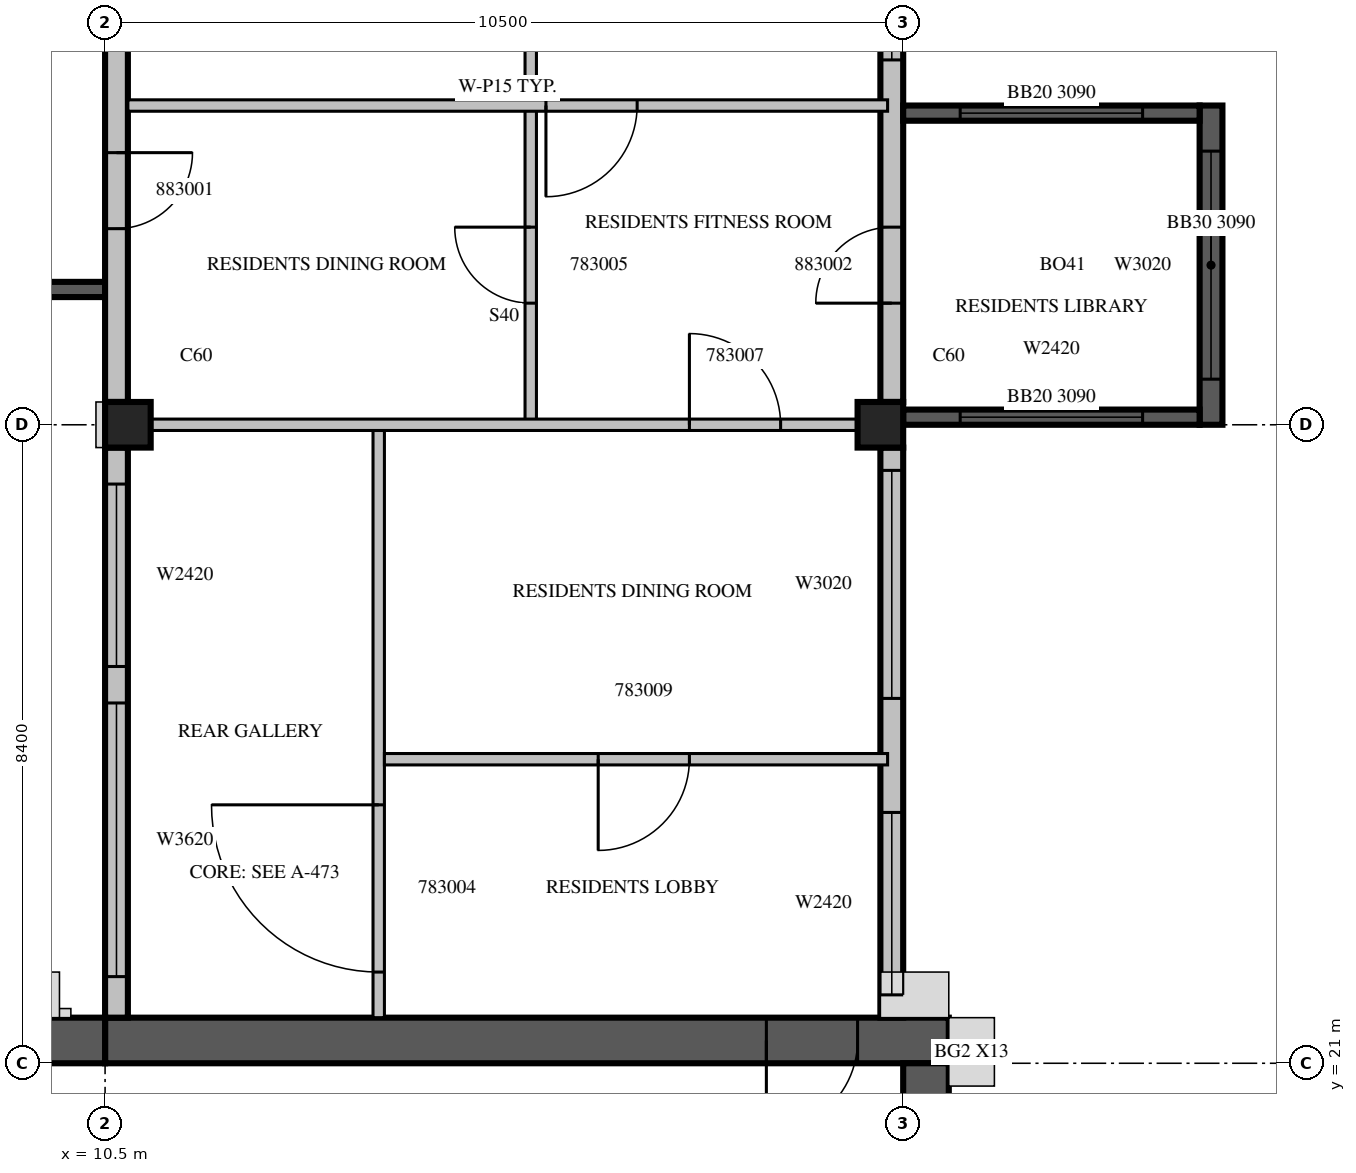
"""IFC4 building model, lengths in metres.
Left out: names, types, materials, properties, quantities, classifications, styles, units other than length and angle.
Written with IfcOpenShell. Run it as: python <this file> out.ifc"""

import sys

from ifc_helpers import new_model, si_unit, direction, frame, frame_2d, origin, origin_2d, place, context, subcontext, project, spatial, rectangle, extrude, source, transform, mapped, element, fill, save


model = new_model("IFC4")
c1 = context("Model", 3, precision=1e-05, world=origin(), true_north=direction((0.0, 1.0)))
c2 = subcontext(c1, "Body", "Model", "MODEL_VIEW")
j1 = project(units=[si_unit("LENGTHUNIT", "METRE"), si_unit("PLANEANGLEUNIT", "RADIAN")], contexts=[c1])
p1 = place(None, origin())
s1 = spatial("IfcSite", under=j1, at=p1, CompositionType="ELEMENT")
p2 = place(p1, origin())
s2 = spatial("IfcBuilding", under=s1, at=p2, CompositionType="ELEMENT")
p3 = place(p2, frame((0.0, 0.0, 351.0)))
s3 = spatial("IfcBuildingStorey", under=s2, at=p3, CompositionType="ELEMENT", Elevation=351.0)
m1 = source(origin(), c2, "Body", "SweptSolid", [
    extrude(rectangle(XDim=0.6, YDim=0.6, at=origin_2d()), origin(), (0.0, 0.0, 1.0), 3.5),
])
for number, where, z_axis, x_axis in (
    (1, (10.8, 29.4, 0.0), (0.0, 0.0, 1.0), (1.0, 0.0, 0.0)),
    (2, (20.7, 29.4, 0.0), (0.0, 0.0, 1.0), (1.0, 0.0, 0.0)),
):
    element("IfcColumn", number, at=place(p3, frame(where, z_axis=z_axis, x_axis=x_axis)), inside=s3, PredefinedType="COLUMN", context=c2, shape_type="MappedRepresentation", body=[
        mapped(m1, transform((0.0, 0.0, 0.0), scale=1.0)),
    ])
m2 = source(origin(), c2, "Body", "SweptSolid", [
    extrude(rectangle(XDim=11.1, YDim=0.6, at=frame_2d((5.55, 0.0))), origin(), (0.0, 0.0, 1.0), 3.5),
])
p4 = place(p3, frame((10.5, 21.3, 0.0), z_axis=(0.0, 0.0, 1.0), x_axis=(1.0, 0.0, 0.0)))
e3 = element("IfcWall", 3, at=p4, inside=s3, PredefinedType="SHEAR", context=c2, shape_type="MappedRepresentation", body=[
    mapped(m2, transform((0.0, 0.0, 0.0), scale=1.0)),
])
m3 = source(origin(), c2, "Body", "SweptSolid", [
    extrude(rectangle(XDim=1.2, YDim=2.1, at=frame_2d((0.6, 1.05))), frame((0.0, 0.31, 0.0), z_axis=(0.0, -1.0, 0.0), x_axis=(1.0, 0.0, 0.0)), (0.0, 0.0, 1.0), 0.62),
])
p5 = place(p4, frame((8.7, 0.0, 0.0)))
e4 = element("IfcOpeningElement", 4, at=p5, cuts=e3, PredefinedType="OPENING", context=c2, shape_type="MappedRepresentation", body=[
    mapped(m3, transform((0.0, 0.0, 0.0), scale=1.0)),
])
m4 = source(origin(), c2, "Body", "SweptSolid", [
    extrude(rectangle(XDim=16.8, YDim=0.6, at=frame_2d((8.4, 0.0))), origin(), (0.0, 0.0, 1.0), 3.5),
])
p6 = place(p3, frame((21.3, 4.2, 0.0), z_axis=(0.0, 0.0, 1.0), x_axis=(0.0, 1.0, 0.0)))
e5 = element("IfcWall", 5, at=p6, inside=s3, PredefinedType="SHEAR", context=c2, shape_type="MappedRepresentation", body=[
    mapped(m4, transform((0.0, 0.0, 0.0), scale=1.0)),
])
m5 = source(origin(), c2, "Body", "SweptSolid", [
    extrude(rectangle(XDim=1.2, YDim=2.4, at=frame_2d((0.6, 1.2))), frame((0.0, 0.31, 0.0), z_axis=(0.0, -1.0, 0.0), x_axis=(1.0, 0.0, 0.0)), (0.0, 0.0, 1.0), 0.62),
])
p7 = place(p6, frame((12.0, 0.0, 0.6)))
e6 = element("IfcOpeningElement", 6, at=p7, cuts=e5, PredefinedType="OPENING", context=c2, shape_type="MappedRepresentation", body=[
    mapped(m5, transform((0.0, 0.0, 0.0), scale=1.0)),
])
m6 = source(origin(), c2, "Body", "SweptSolid", [
    extrude(rectangle(XDim=6.6, YDim=0.6, at=frame_2d((3.3, 0.0))), origin(), (0.0, 0.0, 1.0), 3.5),
])
p8 = place(p3, frame((3.9, 21.3, 0.0), z_axis=(0.0, 0.0, 1.0), x_axis=(1.0, 0.0, 0.0)))
e7 = element("IfcWall", 7, at=p8, inside=s3, PredefinedType="SHEAR", context=c2, shape_type="MappedRepresentation", body=[
    mapped(m6, transform((0.0, 0.0, 0.0), scale=1.0)),
])
p9 = place(p8, frame((1.5, 0.0, 0.6)))
e8 = element("IfcOpeningElement", 8, at=p9, cuts=e7, PredefinedType="OPENING", context=c2, shape_type="MappedRepresentation", body=[
    mapped(m5, transform((0.0, 0.0, 0.0), scale=1.0)),
])
p10 = place(p8, frame((3.6, 0.0, 0.6)))
e9 = element("IfcOpeningElement", 9, at=p10, cuts=e7, PredefinedType="OPENING", context=c2, shape_type="MappedRepresentation", body=[
    mapped(m5, transform((0.0, 0.0, 0.0), scale=1.0)),
])
m7 = source(origin(), c2, "Body", "SweptSolid", [
    extrude(rectangle(XDim=3.9, YDim=0.2, at=frame_2d((1.95, 0.0))), origin(), (0.0, 0.0, 1.0), 3.1),
])
p11 = place(p3, frame((10.5, 31.18, 0.0), z_axis=(0.0, 0.0, 1.0), x_axis=(-1.0, 0.0, 0.0)))
e10 = element("IfcWall", 10, at=p11, inside=s3, PredefinedType="SOLIDWALL", context=c2, shape_type="MappedRepresentation", body=[
    mapped(m7, transform((0.0, 0.0, 0.0), scale=1.0)),
])
m8 = source(origin(), c2, "Body", "SweptSolid", [
    extrude(rectangle(XDim=2.4, YDim=2.0, at=frame_2d((1.2, 1.0))), frame((0.0, 0.11, 0.0), z_axis=(0.0, -1.0, 0.0), x_axis=(1.0, 0.0, 0.0)), (0.0, 0.0, 1.0), 0.22),
])
p12 = place(p11, frame((0.75, 0.0, 0.6)))
e11 = element("IfcOpeningElement", 11, at=p12, cuts=e10, PredefinedType="OPENING", context=c2, shape_type="MappedRepresentation", body=[
    mapped(m8, transform((0.0, 0.0, 0.0), scale=1.0)),
])
m9 = source(origin(), c2, "Body", "SweptSolid", [
    extrude(rectangle(XDim=7.5, YDim=0.3, at=frame_2d((3.75, 0.0))), origin(), (0.0, 0.0, 1.0), 3.1),
])
p13 = place(p3, frame((20.85, 21.6, 0.0), z_axis=(0.0, 0.0, 1.0), x_axis=(0.0, 1.0, 0.0)))
e12 = element("IfcWall", 12, at=p13, inside=s3, PredefinedType="STANDARD", context=c2, shape_type="MappedRepresentation", body=[
    mapped(m9, transform((0.0, 0.0, 0.0), scale=1.0)),
])
m10 = source(origin(), c2, "Body", "SweptSolid", [
    extrude(rectangle(XDim=2.4, YDim=2.0, at=frame_2d((1.2, 1.0))), frame((0.0, 0.16, 0.0), z_axis=(0.0, -1.0, 0.0), x_axis=(1.0, 0.0, 0.0)), (0.0, 0.0, 1.0), 0.32),
])
p14 = place(p13, frame((0.3, 0.0, 0.6)))
e13 = element("IfcOpeningElement", 13, at=p14, cuts=e12, PredefinedType="OPENING", context=c2, shape_type="MappedRepresentation", body=[
    mapped(m10, transform((0.0, 0.0, 0.0), scale=1.0)),
])
m11 = source(origin(), c2, "Body", "SweptSolid", [
    extrude(rectangle(XDim=3.0, YDim=2.0, at=frame_2d((1.5, 1.0))), frame((0.0, 0.16, 0.0), z_axis=(0.0, -1.0, 0.0), x_axis=(1.0, 0.0, 0.0)), (0.0, 0.0, 1.0), 0.32),
])
p15 = place(p13, frame((4.2, 0.0, 0.6)))
e14 = element("IfcOpeningElement", 14, at=p15, cuts=e12, PredefinedType="OPENING", context=c2, shape_type="MappedRepresentation", body=[
    mapped(m11, transform((0.0, 0.0, 0.0), scale=1.0)),
])
m12 = source(origin(), c2, "Body", "SweptSolid", [
    extrude(rectangle(XDim=7.8, YDim=0.3, at=frame_2d((3.9, 0.0))), origin(), (0.0, 0.0, 1.0), 3.1),
])
p16 = place(p3, frame((20.85, 29.7, 0.0), z_axis=(0.0, 0.0, 1.0), x_axis=(0.0, 1.0, 0.0)))
e15 = element("IfcWall", 15, at=p16, inside=s3, PredefinedType="STANDARD", context=c2, shape_type="MappedRepresentation", body=[
    mapped(m12, transform((0.0, 0.0, 0.0), scale=1.0)),
])
p17 = place(p16, frame((4.5, 0.0, 0.6)))
e16 = element("IfcOpeningElement", 16, at=p17, cuts=e15, PredefinedType="OPENING", context=c2, shape_type="MappedRepresentation", body=[
    mapped(m11, transform((0.0, 0.0, 0.0), scale=1.0)),
])
m13 = source(origin(), c2, "Body", "SweptSolid", [
    extrude(rectangle(XDim=1.0, YDim=2.1, at=frame_2d((0.5, 1.05))), frame((0.0, 0.16, 0.0), z_axis=(0.0, -1.0, 0.0), x_axis=(1.0, 0.0, 0.0)), (0.0, 0.0, 1.0), 0.32),
])
p18 = place(p16, frame((1.3, 0.0, 0.0)))
e17 = element("IfcOpeningElement", 17, at=p18, cuts=e15, PredefinedType="OPENING", context=c2, shape_type="MappedRepresentation", body=[
    mapped(m13, transform((0.0, 0.0, 0.0), scale=1.0)),
])
p19 = place(p3, frame((10.65, 37.5, 0.0), z_axis=(0.0, 0.0, 1.0), x_axis=(0.0, -1.0, 0.0)))
e18 = element("IfcWall", 18, at=p19, inside=s3, PredefinedType="STANDARD", context=c2, shape_type="MappedRepresentation", body=[
    mapped(m12, transform((0.0, 0.0, 0.0), scale=1.0)),
])
p20 = place(p19, frame((4.52, 0.0, 0.0)))
e19 = element("IfcOpeningElement", 19, at=p20, cuts=e18, PredefinedType="OPENING", context=c2, shape_type="MappedRepresentation", body=[
    mapped(m13, transform((0.0, 0.0, 0.0), scale=1.0)),
])
p21 = place(p3, frame((10.65, 29.1, 0.0), z_axis=(0.0, 0.0, 1.0), x_axis=(0.0, -1.0, 0.0)))
e20 = element("IfcWall", 20, at=p21, inside=s3, PredefinedType="STANDARD", context=c2, shape_type="MappedRepresentation", body=[
    mapped(m9, transform((0.0, 0.0, 0.0), scale=1.0)),
])
m14 = source(origin(), c2, "Body", "SweptSolid", [
    extrude(rectangle(XDim=3.6, YDim=2.0, at=frame_2d((1.8, 1.0))), frame((0.0, 0.16, 0.0), z_axis=(0.0, -1.0, 0.0), x_axis=(1.0, 0.0, 0.0)), (0.0, 0.0, 1.0), 0.32),
])
p22 = place(p21, frame((3.36, 0.0, 0.6)))
e21 = element("IfcOpeningElement", 21, at=p22, cuts=e20, PredefinedType="OPENING", context=c2, shape_type="MappedRepresentation", body=[
    mapped(m14, transform((0.0, 0.0, 0.0), scale=1.0)),
])
p23 = place(p21, frame((0.48, 0.0, 0.6)))
e22 = element("IfcOpeningElement", 22, at=p23, cuts=e20, PredefinedType="OPENING", context=c2, shape_type="MappedRepresentation", body=[
    mapped(m10, transform((0.0, 0.0, 0.0), scale=1.0)),
])
m15 = source(origin(), c2, "Body", "SweptSolid", [
    extrude(rectangle(XDim=4.2, YDim=0.3, at=frame_2d((2.1, 0.0))), origin(), (0.0, 0.0, 1.0), 3.09),
])
p24 = place(p3, frame((25.05, 29.4, 0.0), z_axis=(0.0, 0.0, 1.0), x_axis=(0.0, 1.0, 0.0)))
e23 = element("IfcWall", 23, at=p24, inside=s3, PredefinedType="SOLIDWALL", context=c2, shape_type="MappedRepresentation", body=[
    mapped(m15, transform((0.0, 0.0, 0.0), scale=1.0)),
])
p25 = place(p24, frame((0.6, 0.0, 0.6)))
e24 = element("IfcOpeningElement", 24, at=p25, cuts=e23, PredefinedType="OPENING", context=c2, shape_type="MappedRepresentation", body=[
    mapped(m11, transform((0.0, 0.0, 0.0), scale=1.0)),
])
m16 = source(origin(), c2, "Body", "SweptSolid", [
    extrude(rectangle(XDim=3.9, YDim=0.2, at=frame_2d((1.95, 0.0))), origin(), (0.0, 0.0, 1.0), 3.09),
])
p26 = place(p3, frame((21.0, 29.5, 0.0), z_axis=(0.0, 0.0, 1.0), x_axis=(1.0, 0.0, 0.0)))
e25 = element("IfcWall", 25, at=p26, inside=s3, PredefinedType="SOLIDWALL", context=c2, shape_type="MappedRepresentation", body=[
    mapped(m16, transform((0.0, 0.0, 0.0), scale=1.0)),
])
p27 = place(p26, frame((0.75, 0.0, 0.6)))
e26 = element("IfcOpeningElement", 26, at=p27, cuts=e25, PredefinedType="OPENING", context=c2, shape_type="MappedRepresentation", body=[
    mapped(m8, transform((0.0, 0.0, 0.0), scale=1.0)),
])
p28 = place(p3, frame((21.0, 33.5, 0.0), z_axis=(0.0, 0.0, 1.0), x_axis=(1.0, 0.0, 0.0)))
e27 = element("IfcWall", 27, at=p28, inside=s3, PredefinedType="SOLIDWALL", context=c2, shape_type="MappedRepresentation", body=[
    mapped(m16, transform((0.0, 0.0, 0.0), scale=1.0)),
])
p29 = place(p28, frame((0.75, 0.0, 0.6)))
e28 = element("IfcOpeningElement", 28, at=p29, cuts=e27, PredefinedType="OPENING", context=c2, shape_type="MappedRepresentation", body=[
    mapped(m8, transform((0.0, 0.0, 0.0), scale=1.0)),
])
m17 = source(origin(), c2, "Body", "SweptSolid", [
    extrude(rectangle(XDim=7.725, YDim=0.15, at=frame_2d((3.862, 0.0))), origin(), (0.0, 0.0, 1.0), 3.1),
])
p30 = place(p3, frame((14.1, 29.325, 0.0), z_axis=(0.0, 0.0, 1.0), x_axis=(0.0, -1.0, 0.0)))
e29 = element("IfcWall", 29, at=p30, inside=s3, PredefinedType="PARTITIONING", context=c2, shape_type="MappedRepresentation", body=[
    mapped(m17, transform((0.0, 0.0, 0.0), scale=1.0)),
])
m18 = source(origin(), c2, "Body", "SweptSolid", [
    extrude(rectangle(XDim=2.2, YDim=2.1, at=frame_2d((1.1, 1.05))), frame((0.0, 0.085, 0.0), z_axis=(0.0, -1.0, 0.0), x_axis=(1.0, 0.0, 0.0)), (0.0, 0.0, 1.0), 0.17),
])
p31 = place(p30, frame((4.925, 0.0, 0.0)))
e30 = element("IfcOpeningElement", 30, at=p31, cuts=e29, PredefinedType="OPENING", context=c2, shape_type="MappedRepresentation", body=[
    mapped(m18, transform((0.0, 0.0, 0.0), scale=1.0)),
])
m19 = source(origin(), c2, "Body", "SweptSolid", [
    extrude(rectangle(XDim=6.62, YDim=0.15, at=frame_2d((3.31, 0.0))), origin(), (0.0, 0.0, 1.0), 3.1),
])
p32 = place(p3, frame((14.175, 25.0, 0.0), z_axis=(0.0, 0.0, 1.0), x_axis=(1.0, 0.0, 0.0)))
e31 = element("IfcWall", 31, at=p32, inside=s3, PredefinedType="PARTITIONING", context=c2, shape_type="MappedRepresentation", body=[
    mapped(m19, transform((0.0, 0.0, 0.0), scale=1.0)),
])
m20 = source(origin(), c2, "Body", "SweptSolid", [
    extrude(rectangle(XDim=1.2, YDim=2.1, at=frame_2d((0.6, 1.05))), frame((0.0, 0.085, 0.0), z_axis=(0.0, -1.0, 0.0), x_axis=(1.0, 0.0, 0.0)), (0.0, 0.0, 1.0), 0.17),
])
p33 = place(p32, frame((2.812, 0.0, 0.0)))
e32 = element("IfcOpeningElement", 32, at=p33, cuts=e31, PredefinedType="OPENING", context=c2, shape_type="MappedRepresentation", body=[
    mapped(m20, transform((0.0, 0.0, 0.0), scale=1.0)),
])
m21 = source(origin(), c2, "Body", "SweptSolid", [
    extrude(rectangle(XDim=4.2, YDim=0.15, at=frame_2d((2.1, 0.0))), origin(), (0.0, 0.0, 1.0), 3.1),
])
p34 = place(p3, frame((16.1, 33.6, 0.0), z_axis=(0.0, 0.0, 1.0), x_axis=(0.0, -1.0, 0.0)))
e33 = element("IfcWall", 33, at=p34, inside=s3, PredefinedType="PARTITIONING", context=c2, shape_type="MappedRepresentation", body=[
    mapped(m21, transform((0.0, 0.0, 0.0), scale=1.0)),
])
m22 = source(origin(), c2, "Body", "SweptSolid", [
    extrude(rectangle(XDim=1.0, YDim=2.1, at=frame_2d((0.5, 1.05))), frame((0.0, 0.085, 0.0), z_axis=(0.0, -1.0, 0.0), x_axis=(1.0, 0.0, 0.0)), (0.0, 0.0, 1.0), 0.17),
])
p35 = place(p34, frame((1.6, 0.0, 0.0)))
e34 = element("IfcOpeningElement", 34, at=p35, cuts=e33, PredefinedType="OPENING", context=c2, shape_type="MappedRepresentation", body=[
    mapped(m22, transform((0.0, 0.0, 0.0), scale=1.0)),
])
m23 = source(origin(), c2, "Body", "SweptSolid", [
    extrude(rectangle(XDim=4.105, YDim=0.15, at=frame_2d((2.053, 0.0))), origin(), (0.0, 0.0, 1.0), 3.1),
])
p36 = place(p3, frame((16.1, 37.725, 0.0), z_axis=(0.0, 0.0, 1.0), x_axis=(0.0, -1.0, 0.0)))
e35 = element("IfcWall", 35, at=p36, inside=s3, PredefinedType="PARTITIONING", context=c2, shape_type="MappedRepresentation", body=[
    mapped(m23, transform((0.0, 0.0, 0.0), scale=1.0)),
])
p37 = place(p36, frame((1.525, 0.0, 0.0)))
e36 = element("IfcOpeningElement", 36, at=p37, cuts=e35, PredefinedType="OPENING", context=c2, shape_type="MappedRepresentation", body=[
    mapped(m22, transform((0.0, 0.0, 0.0), scale=1.0)),
])
m24 = source(origin(), c2, "Body", "SweptSolid", [
    extrude(rectangle(XDim=9.302, YDim=0.15, at=frame_2d((4.651, 0.0))), origin(), (0.0, 0.0, 1.0), 3.1),
])
p38 = place(p3, frame((11.099, 29.4, 0.0), z_axis=(0.0, 0.0, 1.0), x_axis=(1.0, 0.0, 0.0)))
e37 = element("IfcWall", 37, at=p38, inside=s3, PredefinedType="PARTITIONING", context=c2, shape_type="MappedRepresentation", body=[
    mapped(m24, transform((0.0, 0.0, 0.0), scale=1.0)),
])
p39 = place(p38, frame((7.088, 0.0, 0.0)))
e38 = element("IfcOpeningElement", 38, at=p39, cuts=e37, PredefinedType="OPENING", context=c2, shape_type="MappedRepresentation", body=[
    mapped(m20, transform((0.0, 0.0, 0.0), scale=1.0)),
])
m25 = source(origin(), c2, "Body", "SweptSolid", [
    extrude(rectangle(XDim=9.995, YDim=0.15, at=frame_2d((4.997, 0.0))), origin(), (0.0, 0.0, 1.0), 3.1),
])
p40 = place(p3, frame((10.8, 33.6, 0.0), z_axis=(0.0, 0.0, 1.0), x_axis=(1.0, 0.0, 0.0)))
e39 = element("IfcWall", 39, at=p40, inside=s3, PredefinedType="PARTITIONING", context=c2, shape_type="MappedRepresentation", body=[
    mapped(m25, transform((0.0, 0.0, 0.0), scale=1.0)),
])
p41 = place(p40, frame((5.5, 0.0, 0.0)))
e40 = element("IfcOpeningElement", 40, at=p41, cuts=e39, PredefinedType="OPENING", context=c2, shape_type="MappedRepresentation", body=[
    mapped(m20, transform((0.0, 0.0, 0.0), scale=1.0)),
])
m26 = source(origin(), c2, "Body", "SweptSolid", [
    extrude(rectangle(XDim=2.4, YDim=2.0, at=frame_2d((1.2, 1.0))), frame((0.0, 0.03, 0.0), z_axis=(0.0, -1.0, 0.0), x_axis=(1.0, 0.0, 0.0)), (0.0, 0.0, 1.0), 0.06),
])
p42 = place(p14, origin())
e41 = element("IfcWindow", 41, at=p42, inside=s3, PartitioningType="SINGLE_PANEL", PredefinedType="WINDOW", context=c2, shape_type="MappedRepresentation", body=[
    mapped(m26, transform((0.0, 0.0, 0.0), scale=1.0)),
])
fill(e13, e41)
m27 = source(origin(), c2, "Body", "SweptSolid", [
    extrude(rectangle(XDim=3.0, YDim=2.0, at=frame_2d((1.5, 1.0))), frame((0.0, 0.03, 0.0), z_axis=(0.0, -1.0, 0.0), x_axis=(1.0, 0.0, 0.0)), (0.0, 0.0, 1.0), 0.06),
])
p43 = place(p15, origin())
e42 = element("IfcWindow", 42, at=p43, inside=s3, PartitioningType="SINGLE_PANEL", PredefinedType="WINDOW", context=c2, shape_type="MappedRepresentation", body=[
    mapped(m27, transform((0.0, 0.0, 0.0), scale=1.0)),
])
fill(e14, e42)
p44 = place(p17, origin())
e43 = element("IfcWindow", 43, at=p44, inside=s3, PartitioningType="SINGLE_PANEL", PredefinedType="WINDOW", context=c2, shape_type="MappedRepresentation", body=[
    mapped(m27, transform((0.0, 0.0, 0.0), scale=1.0)),
])
fill(e16, e43)
m28 = source(origin(), c2, "Body", "SweptSolid", [
    extrude(rectangle(XDim=3.6, YDim=2.0, at=frame_2d((1.8, 1.0))), frame((0.0, 0.03, 0.0), z_axis=(0.0, -1.0, 0.0), x_axis=(1.0, 0.0, 0.0)), (0.0, 0.0, 1.0), 0.06),
])
p45 = place(p22, origin())
e44 = element("IfcWindow", 44, at=p45, inside=s3, PartitioningType="SINGLE_PANEL", PredefinedType="WINDOW", context=c2, shape_type="MappedRepresentation", body=[
    mapped(m28, transform((0.0, 0.0, 0.0), scale=1.0)),
])
fill(e21, e44)
p46 = place(p23, origin())
e45 = element("IfcWindow", 45, at=p46, inside=s3, PartitioningType="SINGLE_PANEL", PredefinedType="WINDOW", context=c2, shape_type="MappedRepresentation", body=[
    mapped(m26, transform((0.0, 0.0, 0.0), scale=1.0)),
])
fill(e22, e45)
p47 = place(p25, origin())
e46 = element("IfcWindow", 46, at=p47, inside=s3, PartitioningType="SINGLE_PANEL", PredefinedType="WINDOW", context=c2, shape_type="MappedRepresentation", body=[
    mapped(m27, transform((0.0, 0.0, 0.0), scale=1.0)),
])
fill(e24, e46)
p48 = place(p27, origin())
e47 = element("IfcWindow", 47, at=p48, inside=s3, PartitioningType="SINGLE_PANEL", PredefinedType="WINDOW", context=c2, shape_type="MappedRepresentation", body=[
    mapped(m26, transform((0.0, 0.0, 0.0), scale=1.0)),
])
fill(e26, e47)
p49 = place(p29, origin())
e48 = element("IfcWindow", 48, at=p49, inside=s3, PartitioningType="SINGLE_PANEL", PredefinedType="WINDOW", context=c2, shape_type="MappedRepresentation", body=[
    mapped(m26, transform((0.0, 0.0, 0.0), scale=1.0)),
])
fill(e28, e48)
m29 = source(origin(), c2, "Body", "SweptSolid", [
    extrude(rectangle(XDim=1.2, YDim=2.1, at=frame_2d((0.6, 1.05))), frame((0.0, 0.025, 0.0), z_axis=(0.0, -1.0, 0.0), x_axis=(1.0, 0.0, 0.0)), (0.0, 0.0, 1.0), 0.05),
])
p50 = place(p5, origin())
e49 = element("IfcDoor", 49, at=p50, inside=s3, OperationType="SINGLE_SWING_RIGHT", PredefinedType="DOOR", context=c2, shape_type="MappedRepresentation", body=[
    mapped(m29, transform((0.0, 0.0, 0.0), scale=1.0)),
])
fill(e4, e49)
m30 = source(origin(), c2, "Body", "SweptSolid", [
    extrude(rectangle(XDim=2.2, YDim=2.1, at=frame_2d((1.1, 1.05))), frame((0.0, 0.025, 0.0), z_axis=(0.0, -1.0, 0.0), x_axis=(1.0, 0.0, 0.0)), (0.0, 0.0, 1.0), 0.05),
])
p51 = place(p31, origin())
e50 = element("IfcDoor", 50, at=p51, inside=s3, OperationType="DOUBLE_DOOR_SINGLE_SWING", PredefinedType="DOOR", context=c2, shape_type="MappedRepresentation", body=[
    mapped(m30, transform((0.0, 0.0, 0.0), scale=1.0)),
])
fill(e30, e50)
m31 = source(origin(), c2, "Body", "SweptSolid", [
    extrude(rectangle(XDim=1.0, YDim=2.1, at=frame_2d((0.5, 1.05))), frame((0.0, 0.025, 0.0), z_axis=(0.0, -1.0, 0.0), x_axis=(1.0, 0.0, 0.0)), (0.0, 0.0, 1.0), 0.05),
])
p52 = place(p35, origin())
e51 = element("IfcDoor", 51, at=p52, inside=s3, OperationType="SINGLE_SWING_RIGHT", PredefinedType="DOOR", context=c2, shape_type="MappedRepresentation", body=[
    mapped(m31, transform((0.0, 0.0, 0.0), scale=1.0)),
])
fill(e34, e51)
p53 = place(p39, origin())
e52 = element("IfcDoor", 52, at=p53, inside=s3, OperationType="SINGLE_SWING_LEFT", PredefinedType="DOOR", context=c2, shape_type="MappedRepresentation", body=[
    mapped(m29, transform((0.0, 0.0, 0.0), scale=1.0)),
])
fill(e38, e52)
p54 = place(p41, origin())
e53 = element("IfcDoor", 53, at=p54, inside=s3, OperationType="SINGLE_SWING_RIGHT", PredefinedType="DOOR", context=c2, shape_type="MappedRepresentation", body=[
    mapped(m29, transform((0.0, 0.0, 0.0), scale=1.0)),
])
fill(e40, e53)
p55 = place(p33, origin())
e54 = element("IfcDoor", 54, at=p55, inside=s3, OperationType="SINGLE_SWING_RIGHT", PredefinedType="DOOR", context=c2, shape_type="MappedRepresentation", body=[
    mapped(m29, transform((0.0, 0.0, 0.0), scale=1.0)),
])
fill(e32, e54)
p56 = place(p20, origin())
e55 = element("IfcDoor", 55, at=p56, inside=s3, OperationType="SINGLE_SWING_LEFT", PredefinedType="DOOR", context=c2, shape_type="MappedRepresentation", body=[
    mapped(m31, transform((0.0, 0.0, 0.0), scale=1.0)),
])
fill(e19, e55)
p57 = place(p18, origin())
e56 = element("IfcDoor", 56, at=p57, inside=s3, OperationType="SINGLE_SWING_LEFT", PredefinedType="DOOR", context=c2, shape_type="MappedRepresentation", body=[
    mapped(m31, transform((0.0, 0.0, 0.0), scale=1.0)),
])
fill(e17, e56)
save(model, sys.argv[1])
